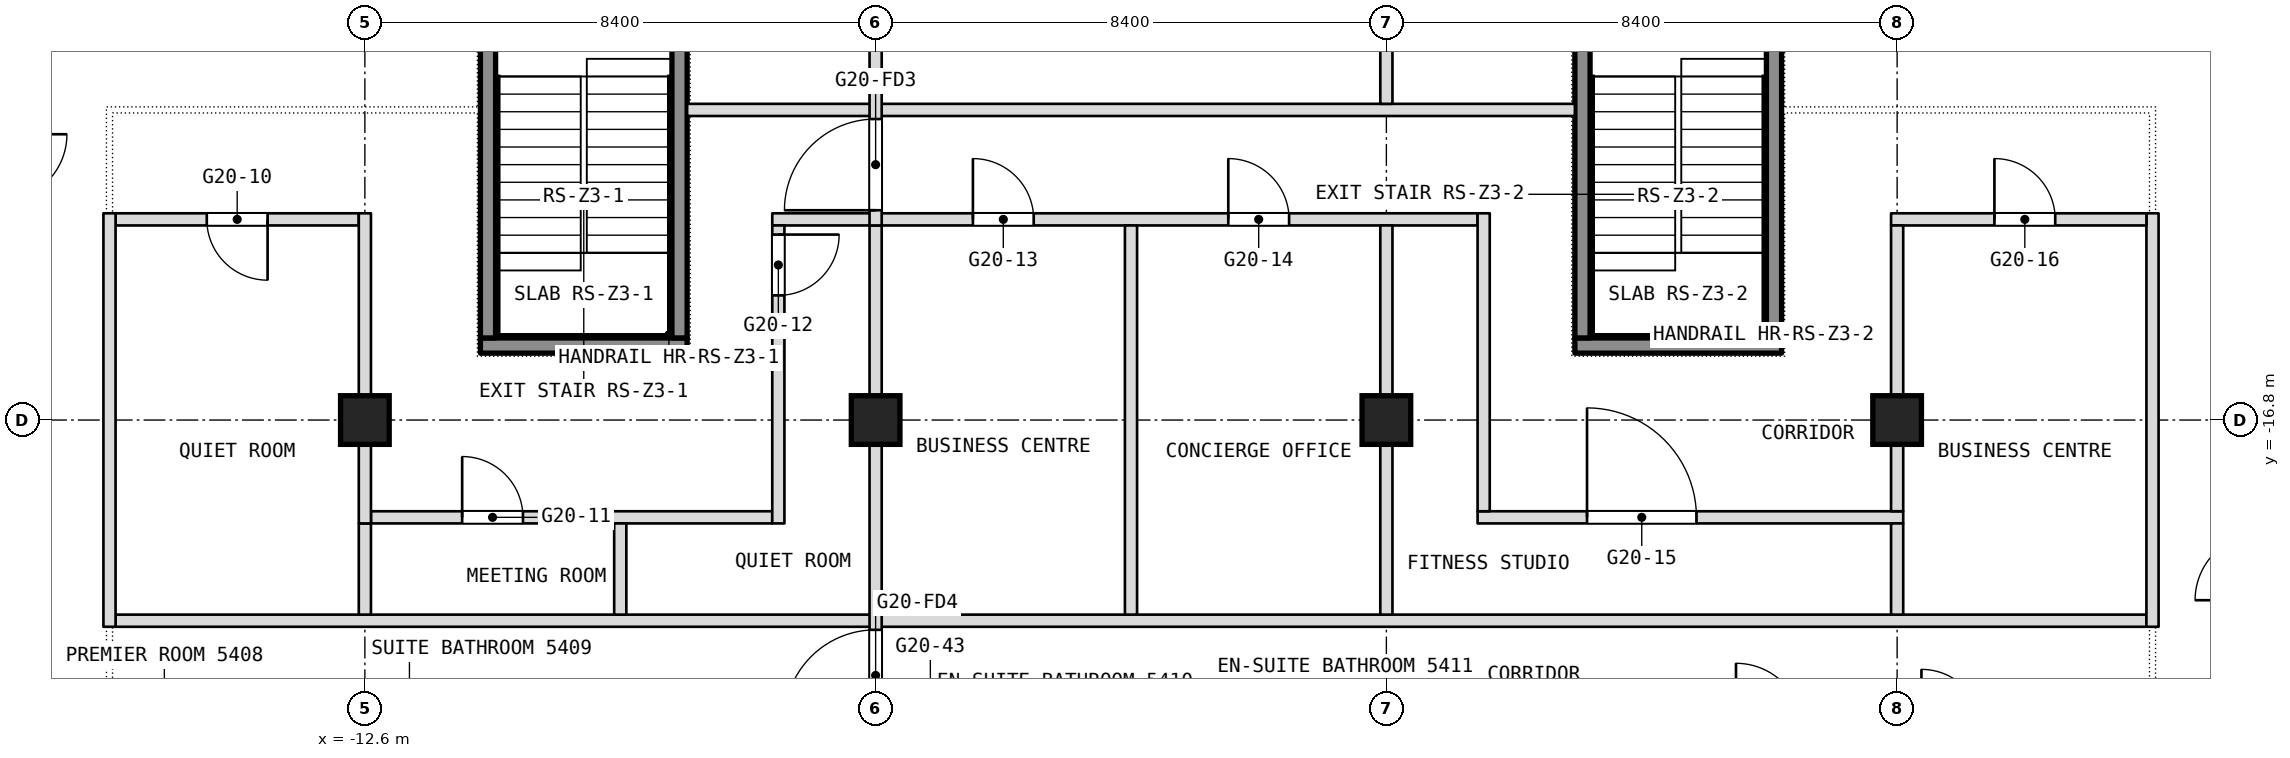
"""IFC4 building model, lengths in metres.
Left out: names, types, materials, properties, quantities, classifications, styles, units other than length and angle.
Written with IfcOpenShell. Run it as: python <this file> out.ifc"""

import sys

from ifc_helpers import new_model, si_unit, direction, frame, frame_2d, origin, origin_2d, place, context, subcontext, project, spatial, rectangle, extrude, element, fill, save


model = new_model("IFC4")
c1 = context("Model", 3, precision=1e-05, world=origin(), true_north=direction((0.0, 1.0)))
c2 = subcontext(c1, "Body", "Model", "MODEL_VIEW")
j1 = project(units=[si_unit("LENGTHUNIT", "METRE"), si_unit("PLANEANGLEUNIT", "RADIAN")], contexts=[c1])
p1 = place(None, origin())
s1 = spatial("IfcSite", under=j1, at=p1, CompositionType="ELEMENT")
p2 = place(p1, origin())
s2 = spatial("IfcBuilding", under=s1, at=p2, CompositionType="ELEMENT")
p3 = place(p2, frame((0.0, 0.0, 230.9)))
s3 = spatial("IfcBuildingStorey", under=s2, at=p3, CompositionType="ELEMENT", Elevation=230.9)
for number, where, z_axis, x_axis in (
    (1, (-12.6, -16.8, 0.0), (0.0, 0.0, 1.0), (1.0, 0.0, 0.0)),
    (2, (-4.2, -16.8, 0.0), (0.0, 0.0, 1.0), (1.0, 0.0, 0.0)),
    (3, (4.2, -16.8, 0.0), (0.0, 0.0, 1.0), (1.0, 0.0, 0.0)),
    (4, (12.6, -16.8, 0.0), (0.0, 0.0, 1.0), (1.0, 0.0, 0.0)),
):
    element("IfcColumn", number, at=place(p3, frame(where, z_axis=z_axis, x_axis=x_axis)), inside=s3, PredefinedType="COLUMN", context=c2, shape_type="SweptSolid", body=[
        extrude(rectangle(XDim=0.8, YDim=0.8, at=origin_2d()), origin(), (0.0, 0.0, 1.0), 3.6),
    ])
p4 = place(p3, frame((-16.7, -20.1, 0.0), z_axis=(0.0, 0.0, 1.0), x_axis=(1.0, 0.0, 0.0)))
e5 = element("IfcWall", 5, at=p4, inside=s3, PredefinedType="PARTITIONING", context=c2, shape_type="SweptSolid", body=[
    extrude(rectangle(XDim=33.4, YDim=0.2, at=frame_2d((16.7, 0.0))), origin(), (0.0, 0.0, 1.0), 3.34),
])
p5 = place(p3, frame((-12.5, -18.4, 0.0), z_axis=(0.0, 0.0, 1.0), x_axis=(1.0, 0.0, 0.0)))
e6 = element("IfcWall", 6, at=p5, inside=s3, PredefinedType="PARTITIONING", context=c2, shape_type="SweptSolid", body=[
    extrude(rectangle(XDim=6.6, YDim=0.2, at=frame_2d((3.3, 0.0))), origin(), (0.0, 0.0, 1.0), 3.34),
])
p6 = place(p5, frame((1.5, 0.0, 0.0)))
e7 = element("IfcOpeningElement", 7, at=p6, cuts=e6, PredefinedType="OPENING", context=c2, shape_type="SweptSolid", body=[
    extrude(rectangle(XDim=1.0, YDim=2.1, at=frame_2d((0.5, 1.05))), frame((0.0, 0.1, 0.0), z_axis=(0.0, -1.0, 0.0), x_axis=(1.0, 0.0, 0.0)), (0.0, 0.0, 1.0), 0.2),
])
p7 = place(p3, frame((5.7, -18.4, 0.0), z_axis=(0.0, 0.0, 1.0), x_axis=(1.0, 0.0, 0.0)))
e8 = element("IfcWall", 8, at=p7, inside=s3, PredefinedType="PARTITIONING", context=c2, shape_type="SweptSolid", body=[
    extrude(rectangle(XDim=7.0, YDim=0.2, at=frame_2d((3.5, 0.0))), origin(), (0.0, 0.0, 1.0), 3.34),
])
p8 = place(p7, frame((1.8, 0.0, 0.0)))
e9 = element("IfcOpeningElement", 9, at=p8, cuts=e8, PredefinedType="OPENING", context=c2, shape_type="SweptSolid", body=[
    extrude(rectangle(XDim=1.8, YDim=2.1, at=frame_2d((0.9, 1.05))), frame((0.0, 0.1, 0.0), z_axis=(0.0, -1.0, 0.0), x_axis=(1.0, 0.0, 0.0)), (0.0, 0.0, 1.0), 0.2),
])
p9 = place(p3, frame((16.8, -20.2, 0.0), z_axis=(0.0, 0.0, 1.0), x_axis=(0.0, 1.0, 0.0)))
e10 = element("IfcWall", 10, at=p9, inside=s3, PredefinedType="PARTITIONING", context=c2, shape_type="SweptSolid", body=[
    extrude(rectangle(XDim=6.8, YDim=0.2, at=frame_2d((3.4, 0.0))), origin(), (0.0, 0.0, 1.0), 3.34),
])
p10 = place(p3, frame((-16.7, -13.5, 0.0), z_axis=(0.0, 0.0, 1.0), x_axis=(1.0, 0.0, 0.0)))
e11 = element("IfcWall", 11, at=p10, inside=s3, PredefinedType="PARTITIONING", context=c2, shape_type="SweptSolid", body=[
    extrude(rectangle(XDim=4.0, YDim=0.2, at=frame_2d((2.0, 0.0))), origin(), (0.0, 0.0, 1.0), 3.34),
])
p11 = place(p10, frame((1.5, 0.0, 0.0)))
e12 = element("IfcOpeningElement", 12, at=p11, cuts=e11, PredefinedType="OPENING", context=c2, shape_type="SweptSolid", body=[
    extrude(rectangle(XDim=1.0, YDim=2.1, at=frame_2d((0.5, 1.05))), frame((0.0, 0.1, 0.0), z_axis=(0.0, -1.0, 0.0), x_axis=(1.0, 0.0, 0.0)), (0.0, 0.0, 1.0), 0.2),
])
p12 = place(p3, frame((-5.9, -13.5, 0.0), z_axis=(0.0, 0.0, 1.0), x_axis=(1.0, 0.0, 0.0)))
e13 = element("IfcWall", 13, at=p12, inside=s3, PredefinedType="PARTITIONING", context=c2, shape_type="SweptSolid", body=[
    extrude(rectangle(XDim=11.6, YDim=0.2, at=frame_2d((5.8, 0.0))), origin(), (0.0, 0.0, 1.0), 3.34),
])
p13 = place(p12, frame((3.3, 0.0, 0.0)))
e14 = element("IfcOpeningElement", 14, at=p13, cuts=e13, PredefinedType="OPENING", context=c2, shape_type="SweptSolid", body=[
    extrude(rectangle(XDim=1.0, YDim=2.1, at=frame_2d((0.5, 1.05))), frame((0.0, 0.1, 0.0), z_axis=(0.0, -1.0, 0.0), x_axis=(1.0, 0.0, 0.0)), (0.0, 0.0, 1.0), 0.2),
])
p14 = place(p12, frame((7.5, 0.0, 0.0)))
e15 = element("IfcOpeningElement", 15, at=p14, cuts=e13, PredefinedType="OPENING", context=c2, shape_type="SweptSolid", body=[
    extrude(rectangle(XDim=1.0, YDim=2.1, at=frame_2d((0.5, 1.05))), frame((0.0, 0.1, 0.0), z_axis=(0.0, -1.0, 0.0), x_axis=(1.0, 0.0, 0.0)), (0.0, 0.0, 1.0), 0.2),
])
p15 = place(p3, frame((12.5, -13.5, 0.0), z_axis=(0.0, 0.0, 1.0), x_axis=(1.0, 0.0, 0.0)))
e16 = element("IfcWall", 16, at=p15, inside=s3, PredefinedType="PARTITIONING", context=c2, shape_type="SweptSolid", body=[
    extrude(rectangle(XDim=4.2, YDim=0.2, at=frame_2d((2.1, 0.0))), origin(), (0.0, 0.0, 1.0), 3.34),
])
p16 = place(p15, frame((1.7, 0.0, 0.0)))
e17 = element("IfcOpeningElement", 17, at=p16, cuts=e16, PredefinedType="OPENING", context=c2, shape_type="SweptSolid", body=[
    extrude(rectangle(XDim=1.0, YDim=2.1, at=frame_2d((0.5, 1.05))), frame((0.0, 0.1, 0.0), z_axis=(0.0, -1.0, 0.0), x_axis=(1.0, 0.0, 0.0)), (0.0, 0.0, 1.0), 0.2),
])
p17 = place(p3, frame((12.6, -20.0, 0.0), z_axis=(0.0, 0.0, 1.0), x_axis=(0.0, 1.0, 0.0)))
e18 = element("IfcWall", 18, at=p17, inside=s3, PredefinedType="PARTITIONING", context=c2, shape_type="SweptSolid", body=[
    extrude(rectangle(XDim=1.5, YDim=0.2, at=frame_2d((0.75, 0.0))), origin(), (0.0, 0.0, 1.0), 3.34),
])
p18 = place(p3, frame((12.6, -18.3, 0.0), z_axis=(0.0, 0.0, 1.0), x_axis=(0.0, 1.0, 0.0)))
e19 = element("IfcWall", 19, at=p18, inside=s3, PredefinedType="PARTITIONING", context=c2, shape_type="SweptSolid", body=[
    extrude(rectangle(XDim=4.7, YDim=0.2, at=frame_2d((2.35, 0.0))), origin(), (0.0, 0.0, 1.0), 3.34),
])
p19 = place(p3, frame((-7.3, -11.7, 0.0), z_axis=(0.0, 0.0, 1.0), x_axis=(1.0, 0.0, 0.0)))
e20 = element("IfcWall", 20, at=p19, inside=s3, PredefinedType="PARTITIONING", context=c2, shape_type="SweptSolid", body=[
    extrude(rectangle(XDim=14.6, YDim=0.2, at=frame_2d((7.3, 0.0))), origin(), (0.0, 0.0, 1.0), 3.34),
])
p20 = place(p3, frame((5.8, -18.3, 0.0), z_axis=(0.0, 0.0, 1.0), x_axis=(0.0, 1.0, 0.0)))
e21 = element("IfcWall", 21, at=p20, inside=s3, PredefinedType="PARTITIONING", context=c2, shape_type="SweptSolid", body=[
    extrude(rectangle(XDim=4.9, YDim=0.2, at=frame_2d((2.45, 0.0))), origin(), (0.0, 0.0, 1.0), 3.34),
])
p21 = place(p3, frame((4.2, -20.0, 0.0), z_axis=(0.0, 0.0, 1.0), x_axis=(0.0, 1.0, 0.0)))
e22 = element("IfcWall", 22, at=p21, inside=s3, PredefinedType="PARTITIONING", context=c2, shape_type="SweptSolid", body=[
    extrude(rectangle(XDim=6.4, YDim=0.2, at=frame_2d((3.2, 0.0))), origin(), (0.0, 0.0, 1.0), 3.34),
])
p22 = place(p3, frame((4.2, -11.6, 0.0), z_axis=(0.0, 0.0, 1.0), x_axis=(0.0, 1.0, 0.0)))
e23 = element("IfcWall", 23, at=p22, inside=s3, PredefinedType="PARTITIONING", context=c2, shape_type="SweptSolid", body=[
    extrude(rectangle(XDim=9.7, YDim=0.2, at=frame_2d((4.85, 0.0))), origin(), (0.0, 0.0, 1.0), 3.34),
])
p23 = place(p3, frame((0.0, -20.0, 0.0), z_axis=(0.0, 0.0, 1.0), x_axis=(0.0, 1.0, 0.0)))
e24 = element("IfcWall", 24, at=p23, inside=s3, PredefinedType="PARTITIONING", context=c2, shape_type="SweptSolid", body=[
    extrude(rectangle(XDim=6.4, YDim=0.2, at=frame_2d((3.2, 0.0))), origin(), (0.0, 0.0, 1.0), 3.34),
])
p24 = place(p3, frame((-4.2, -22.0, 0.0), z_axis=(0.0, 0.0, 1.0), x_axis=(0.0, 1.0, 0.0)))
e25 = element("IfcWall", 25, at=p24, inside=s3, PredefinedType="PARTITIONING", context=c2, shape_type="SweptSolid", body=[
    extrude(rectangle(XDim=8.4, YDim=0.2, at=frame_2d((4.2, 0.0))), origin(), (0.0, 0.0, 1.0), 3.34),
])
p25 = place(p24, frame((0.25, 0.0, 0.0)))
e26 = element("IfcOpeningElement", 26, at=p25, cuts=e25, PredefinedType="OPENING", context=c2, shape_type="SweptSolid", body=[
    extrude(rectangle(XDim=1.5, YDim=2.1, at=frame_2d((0.75, 1.05))), frame((0.0, 0.1, 0.0), z_axis=(0.0, -1.0, 0.0), x_axis=(1.0, 0.0, 0.0)), (0.0, 0.0, 1.0), 0.2),
])
p26 = place(p3, frame((-4.2, -13.6, 0.0), z_axis=(0.0, 0.0, 1.0), x_axis=(0.0, 1.0, 0.0)))
e27 = element("IfcWall", 27, at=p26, inside=s3, PredefinedType="PARTITIONING", context=c2, shape_type="SweptSolid", body=[
    extrude(rectangle(XDim=13.6, YDim=0.2, at=frame_2d((6.8, 0.0))), origin(), (0.0, 0.0, 1.0), 3.34),
])
p27 = place(p26, frame((11.95, 0.0, 0.0)))
e28 = element("IfcOpeningElement", 28, at=p27, cuts=e27, PredefinedType="OPENING", context=c2, shape_type="SweptSolid", body=[
    extrude(rectangle(XDim=1.5, YDim=2.1, at=frame_2d((0.75, 1.05))), frame((0.0, 0.1, 0.0), z_axis=(0.0, -1.0, 0.0), x_axis=(1.0, 0.0, 0.0)), (0.0, 0.0, 1.0), 0.2),
])
p28 = place(p26, frame((0.25, 0.0, 0.0)))
e29 = element("IfcOpeningElement", 29, at=p28, cuts=e27, PredefinedType="OPENING", context=c2, shape_type="SweptSolid", body=[
    extrude(rectangle(XDim=1.5, YDim=2.1, at=frame_2d((0.75, 1.05))), frame((0.0, 0.1, 0.0), z_axis=(0.0, -1.0, 0.0), x_axis=(1.0, 0.0, 0.0)), (0.0, 0.0, 1.0), 0.2),
])
p29 = place(p3, frame((-5.8, -18.5, 0.0), z_axis=(0.0, 0.0, 1.0), x_axis=(0.0, 1.0, 0.0)))
e30 = element("IfcWall", 30, at=p29, inside=s3, PredefinedType="PARTITIONING", context=c2, shape_type="SweptSolid", body=[
    extrude(rectangle(XDim=4.9, YDim=0.2, at=frame_2d((2.45, 0.0))), origin(), (0.0, 0.0, 1.0), 3.34),
])
p30 = place(p29, frame((3.75, 0.0, 0.0)))
e31 = element("IfcOpeningElement", 31, at=p30, cuts=e30, PredefinedType="OPENING", context=c2, shape_type="SweptSolid", body=[
    extrude(rectangle(XDim=1.0, YDim=2.1, at=frame_2d((0.5, 1.05))), frame((0.0, 0.1, 0.0), z_axis=(0.0, -1.0, 0.0), x_axis=(1.0, 0.0, 0.0)), (0.0, 0.0, 1.0), 0.2),
])
for number, where, z_axis, x_axis in (
    (32, (-8.4, -20.0, 0.0), (0.0, 0.0, 1.0), (0.0, 1.0, 0.0)),
    (33, (-12.6, -20.0, 0.0), (0.0, 0.0, 1.0), (0.0, 1.0, 0.0)),
):
    element("IfcWall", number, at=place(p3, frame(where, z_axis=z_axis, x_axis=x_axis)), inside=s3, PredefinedType="PARTITIONING", context=c2, shape_type="SweptSolid", body=[
        extrude(rectangle(XDim=1.5, YDim=0.2, at=frame_2d((0.75, 0.0))), origin(), (0.0, 0.0, 1.0), 3.34),
    ])
p31 = place(p3, frame((-12.6, -18.5, 0.0), z_axis=(0.0, 0.0, 1.0), x_axis=(0.0, 1.0, 0.0)))
e34 = element("IfcWall", 34, at=p31, inside=s3, PredefinedType="PARTITIONING", context=c2, shape_type="SweptSolid", body=[
    extrude(rectangle(XDim=5.1, YDim=0.2, at=frame_2d((2.55, 0.0))), origin(), (0.0, 0.0, 1.0), 3.34),
])
p32 = place(p3, frame((-16.8, -20.2, 0.0), z_axis=(0.0, 0.0, 1.0), x_axis=(0.0, 1.0, 0.0)))
e35 = element("IfcWall", 35, at=p32, inside=s3, PredefinedType="PARTITIONING", context=c2, shape_type="SweptSolid", body=[
    extrude(rectangle(XDim=6.8, YDim=0.2, at=frame_2d((3.4, 0.0))), origin(), (0.0, 0.0, 1.0), 3.34),
])
p33 = place(p3, frame((-10.7, -15.575, 0.1), z_axis=(0.0, 0.0, 1.0), x_axis=(1.0, 0.0, 0.0)))
e36 = element("IfcWall", 36, at=p33, inside=s3, PredefinedType="SHEAR", context=c2, shape_type="SweptSolid", body=[
    extrude(rectangle(XDim=3.4, YDim=0.25, at=frame_2d((1.7, 0.0))), origin(), (0.0, 0.0, 1.0), 3.6),
])
for number, where, z_axis, x_axis in (
    (37, (-10.575, -15.45, 0.1), (0.0, 0.0, 1.0), (0.0, 1.0, 0.0)),
    (38, (-7.425, -15.45, 0.1), (0.0, 0.0, 1.0), (0.0, 1.0, 0.0)),
):
    element("IfcWall", number, at=place(p3, frame(where, z_axis=z_axis, x_axis=x_axis)), inside=s3, PredefinedType="SHEAR", context=c2, shape_type="SweptSolid", body=[
        extrude(rectangle(XDim=5.7, YDim=0.25, at=frame_2d((2.85, 0.0))), origin(), (0.0, 0.0, 1.0), 3.6),
    ])
p34 = place(p3, frame((7.3, -15.575, 0.1), z_axis=(0.0, 0.0, 1.0), x_axis=(1.0, 0.0, 0.0)))
e39 = element("IfcWall", 39, at=p34, inside=s3, PredefinedType="SHEAR", context=c2, shape_type="SweptSolid", body=[
    extrude(rectangle(XDim=3.4, YDim=0.25, at=frame_2d((1.7, 0.0))), origin(), (0.0, 0.0, 1.0), 3.6),
])
for number, where, z_axis, x_axis in (
    (40, (7.425, -15.45, 0.1), (0.0, 0.0, 1.0), (0.0, 1.0, 0.0)),
    (41, (10.575, -15.45, 0.1), (0.0, 0.0, 1.0), (0.0, 1.0, 0.0)),
):
    element("IfcWall", number, at=place(p3, frame(where, z_axis=z_axis, x_axis=x_axis)), inside=s3, PredefinedType="SHEAR", context=c2, shape_type="SweptSolid", body=[
        extrude(rectangle(XDim=5.7, YDim=0.25, at=frame_2d((2.85, 0.0))), origin(), (0.0, 0.0, 1.0), 3.6),
    ])
p35 = place(p6, origin())
e42 = element("IfcDoor", 42, at=p35, inside=s3, OperationType="SINGLE_SWING_RIGHT", PredefinedType="DOOR", context=c2, shape_type="SweptSolid", body=[
    extrude(rectangle(XDim=1.0, YDim=2.1, at=frame_2d((0.5, 1.05))), frame((0.0, 0.025, 0.0), z_axis=(0.0, -1.0, 0.0), x_axis=(1.0, 0.0, 0.0)), (0.0, 0.0, 1.0), 0.05),
])
fill(e7, e42)
p36 = place(p8, origin())
e43 = element("IfcDoor", 43, at=p36, inside=s3, OperationType="DOUBLE_DOOR_SINGLE_SWING", PredefinedType="DOOR", context=c2, shape_type="SweptSolid", body=[
    extrude(rectangle(XDim=1.8, YDim=2.1, at=frame_2d((0.9, 1.05))), frame((0.0, 0.025, 0.0), z_axis=(0.0, -1.0, 0.0), x_axis=(1.0, 0.0, 0.0)), (0.0, 0.0, 1.0), 0.05),
])
fill(e9, e43)
p37 = place(p11, origin())
e44 = element("IfcDoor", 44, at=p37, inside=s3, OperationType="SINGLE_SWING_RIGHT", PredefinedType="DOOR", context=c2, shape_type="SweptSolid", body=[
    extrude(rectangle(XDim=1.0, YDim=2.1, at=frame_2d((0.5, 1.05))), frame((0.0, 0.025, 0.0), z_axis=(0.0, -1.0, 0.0), x_axis=(1.0, 0.0, 0.0)), (0.0, 0.0, 1.0), 0.05),
])
fill(e12, e44)
p38 = place(p13, origin())
e45 = element("IfcDoor", 45, at=p38, inside=s3, OperationType="SINGLE_SWING_LEFT", PredefinedType="DOOR", context=c2, shape_type="SweptSolid", body=[
    extrude(rectangle(XDim=1.0, YDim=2.1, at=frame_2d((0.5, 1.05))), frame((0.0, 0.025, 0.0), z_axis=(0.0, -1.0, 0.0), x_axis=(1.0, 0.0, 0.0)), (0.0, 0.0, 1.0), 0.05),
])
fill(e14, e45)
p39 = place(p14, origin())
e46 = element("IfcDoor", 46, at=p39, inside=s3, OperationType="SINGLE_SWING_RIGHT", PredefinedType="DOOR", context=c2, shape_type="SweptSolid", body=[
    extrude(rectangle(XDim=1.0, YDim=2.1, at=frame_2d((0.5, 1.05))), frame((0.0, 0.025, 0.0), z_axis=(0.0, -1.0, 0.0), x_axis=(1.0, 0.0, 0.0)), (0.0, 0.0, 1.0), 0.05),
])
fill(e15, e46)
p40 = place(p16, origin())
e47 = element("IfcDoor", 47, at=p40, inside=s3, OperationType="SINGLE_SWING_RIGHT", PredefinedType="DOOR", context=c2, shape_type="SweptSolid", body=[
    extrude(rectangle(XDim=1.0, YDim=2.1, at=frame_2d((0.5, 1.05))), frame((0.0, 0.025, 0.0), z_axis=(0.0, -1.0, 0.0), x_axis=(1.0, 0.0, 0.0)), (0.0, 0.0, 1.0), 0.05),
])
fill(e17, e47)
p41 = place(p30, origin())
e48 = element("IfcDoor", 48, at=p41, inside=s3, OperationType="SINGLE_SWING_RIGHT", PredefinedType="DOOR", context=c2, shape_type="SweptSolid", body=[
    extrude(rectangle(XDim=1.0, YDim=2.1, at=frame_2d((0.5, 1.05))), frame((0.0, 0.025, 0.0), z_axis=(0.0, -1.0, 0.0), x_axis=(1.0, 0.0, 0.0)), (0.0, 0.0, 1.0), 0.05),
])
fill(e31, e48)
p42 = place(p28, origin())
e49 = element("IfcDoor", 49, at=p42, inside=s3, OperationType="DOUBLE_DOOR_DOUBLE_SWING", PredefinedType="DOOR", context=c2, shape_type="SweptSolid", body=[
    extrude(rectangle(XDim=1.5, YDim=2.1, at=frame_2d((0.75, 1.05))), frame((0.0, 0.025, 0.0), z_axis=(0.0, -1.0, 0.0), x_axis=(1.0, 0.0, 0.0)), (0.0, 0.0, 1.0), 0.05),
])
fill(e29, e49)
p43 = place(p25, origin())
e50 = element("IfcDoor", 50, at=p43, inside=s3, OperationType="DOUBLE_DOOR_DOUBLE_SWING", PredefinedType="DOOR", context=c2, shape_type="SweptSolid", body=[
    extrude(rectangle(XDim=1.5, YDim=2.1, at=frame_2d((0.75, 1.05))), frame((0.0, 0.025, 0.0), z_axis=(0.0, -1.0, 0.0), x_axis=(1.0, 0.0, 0.0)), (0.0, 0.0, 1.0), 0.05),
])
fill(e26, e50)
save(model, sys.argv[1])
